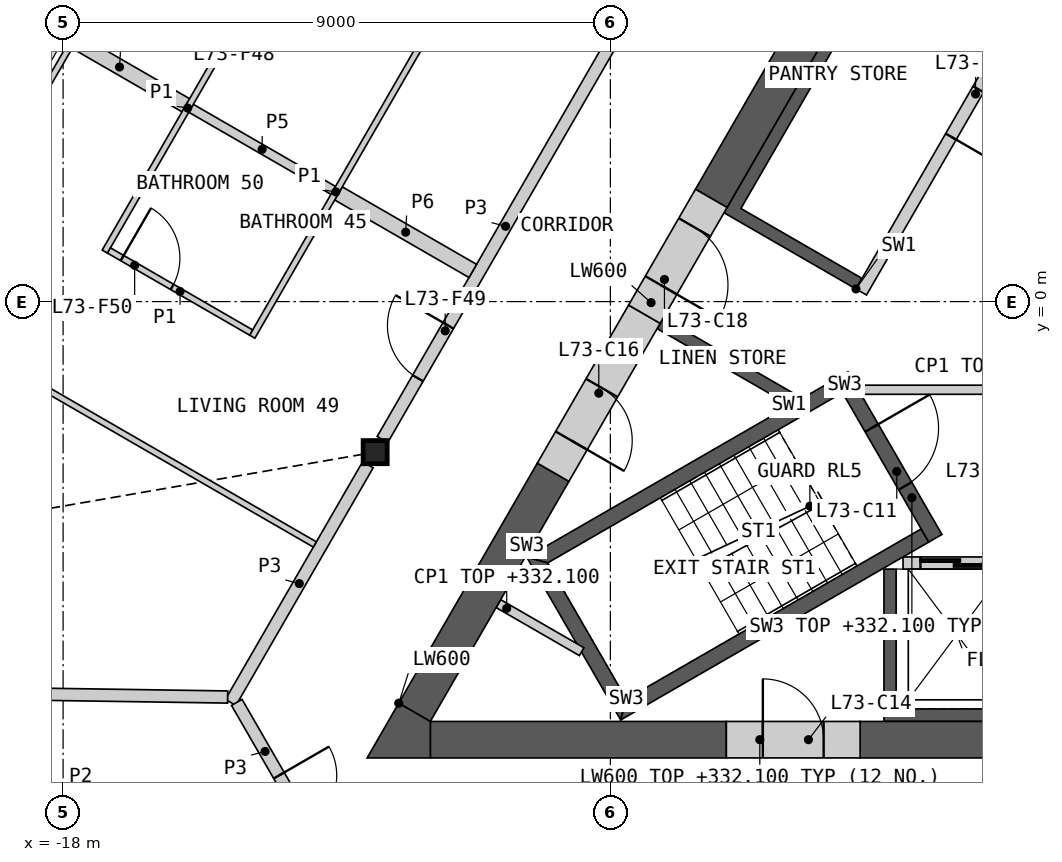
"""IFC4 building model, lengths in metres.
Left out: names, types, materials, properties, quantities, classifications, styles, units other than length and angle.
Written with IfcOpenShell. Run it as: python <this file> out.ifc"""

import sys

from ifc_helpers import new_model, si_unit, direction, frame, frame_2d, origin, origin_2d, place, context, subcontext, project, spatial, polyline, rectangle, i_section, outline, extrude, element, fill, save


model = new_model("IFC4")
c1 = context("Model", 3, precision=1e-05, world=origin(), true_north=direction((0.0, 1.0)))
c2 = subcontext(c1, "Body", "Model", "MODEL_VIEW")
j1 = project(units=[si_unit("LENGTHUNIT", "METRE"), si_unit("PLANEANGLEUNIT", "RADIAN")], contexts=[c1])
p1 = place(None, origin())
s1 = spatial("IfcSite", under=j1, at=p1, CompositionType="ELEMENT")
p2 = place(p1, origin())
s2 = spatial("IfcBuilding", under=s1, at=p2, CompositionType="ELEMENT")
p3 = place(p2, frame((0.0, 0.0, 329.0)))
s3 = spatial("IfcBuildingStorey", under=s2, at=p3, CompositionType="ELEMENT", Elevation=329.0)
p4 = place(p3, frame((-12.868, -2.476, 0.0), z_axis=(0.0, 0.0, 1.0), x_axis=(1.0, 0.0, 0.0)))
e1 = element("IfcColumn", 1, at=p4, inside=s3, PredefinedType="COLUMN", context=c2, shape_type="SweptSolid", body=[
    extrude(i_section(OverallWidth=0.396, OverallDepth=0.381, WebThickness=0.019, FlangeThickness=0.03, at=origin_2d()), origin(), (0.0, 0.0, 1.0), 3.4),
])
p5 = place(p3, origin())
e2 = element("IfcWall", 2, at=p5, inside=s3, PredefinedType="SHEAR", context=c2, shape_type="SweptSolid", body=[
    extrude(outline(polyline([(4.5, -4.4), (4.5, -6.906), (-4.5, -6.906), (-4.5, -4.4), (-4.3, -4.4), (-4.3, -6.7), (-2.3, -6.7), (-2.3, -4.4), (-2.1, -4.4), (-2.1, -6.7), (-0.1, -6.7), (-0.1, -4.4), (0.1, -4.4), (0.1, -6.7), (2.1, -6.7), (2.1, -4.4), (2.3, -4.4), (2.3, -6.7), (4.3, -6.7), (4.3, -4.4), (4.5, -4.4)])), origin(), (0.0, 0.0, 1.0), 3.1),
])
p6 = place(p3, frame((-4.187, -4.3, 0.0), z_axis=(0.0, 0.0, 1.0), x_axis=(1.0, 0.0, 0.0)))
e3 = element("IfcWall", 3, at=p6, inside=s3, PredefinedType="SOLIDWALL", context=c2, shape_type="SweptSolid", body=[
    extrude(rectangle(XDim=8.373, YDim=0.2, at=frame_2d((4.187, 0.0))), origin(), (0.0, 0.0, 1.0), 3.1),
])
p7 = place(p6, frame((0.287, 0.0, 0.0)))
e4 = element("IfcOpeningElement", 4, at=p7, cuts=e3, PredefinedType="OPENING", context=c2, shape_type="SweptSolid", body=[
    extrude(rectangle(XDim=1.2, YDim=2.1, at=frame_2d((0.6, 1.05))), frame((0.0, 0.11, 0.0), z_axis=(0.0, -1.0, 0.0), x_axis=(1.0, 0.0, 0.0)), (0.0, 0.0, 1.0), 0.22),
])
p8 = place(p6, frame((2.387, 0.0, 0.0)))
e5 = element("IfcOpeningElement", 5, at=p8, cuts=e3, PredefinedType="OPENING", context=c2, shape_type="SweptSolid", body=[
    extrude(rectangle(XDim=1.4, YDim=2.1, at=frame_2d((0.7, 1.05))), frame((0.0, 0.11, 0.0), z_axis=(0.0, -1.0, 0.0), x_axis=(1.0, 0.0, 0.0)), (0.0, 0.0, 1.0), 0.22),
])
p9 = place(p6, frame((4.737, 0.0, 0.0)))
e6 = element("IfcOpeningElement", 6, at=p9, cuts=e3, PredefinedType="OPENING", context=c2, shape_type="SweptSolid", body=[
    extrude(rectangle(XDim=1.1, YDim=2.1, at=frame_2d((0.55, 1.05))), frame((0.0, 0.11, 0.0), z_axis=(0.0, -1.0, 0.0), x_axis=(1.0, 0.0, 0.0)), (0.0, 0.0, 1.0), 0.22),
])
p10 = place(p6, frame((6.887, 0.0, 0.0)))
e7 = element("IfcOpeningElement", 7, at=p10, cuts=e3, PredefinedType="OPENING", context=c2, shape_type="SweptSolid", body=[
    extrude(rectangle(XDim=1.2, YDim=2.1, at=frame_2d((0.6, 1.05))), frame((0.0, 0.11, 0.0), z_axis=(0.0, -1.0, 0.0), x_axis=(1.0, 0.0, 0.0)), (0.0, 0.0, 1.0), 0.22),
])
p11 = place(p3, origin())
e8 = element("IfcWall", 8, at=p11, inside=s3, PredefinedType="SHEAR", context=c2, shape_type="SweptSolid", body=[
    extrude(outline(polyline([(-6.061, -1.697), (-8.231, -0.444), (-8.131, -0.271), (-5.96, -1.524), (-6.061, -1.697)])), origin(), (0.0, 0.0, 1.0), 3.1),
])
p12 = place(p3, origin())
e9 = element("IfcWall", 9, at=p12, inside=s3, PredefinedType="SHEAR", context=c2, shape_type="SweptSolid", body=[
    extrude(outline(polyline([(-4.96, 0.208), (-7.131, 1.461), (-3.731, 7.35), (-1.561, 6.097), (-1.66, 5.924), (-3.652, 7.074), (-6.852, 1.531), (-4.861, 0.381), (-4.96, 0.208)])), origin(), (0.0, 0.0, 1.0), 3.1),
])
p13 = place(p3, frame((-1.631, 5.776, 0.0), z_axis=(0.0, 0.0, 1.0), x_axis=(-0.499992876559, -0.866029516466, 0.0)))
e10 = element("IfcWall", 10, at=p13, inside=s3, PredefinedType="SOLIDWALL", context=c2, shape_type="SweptSolid", body=[
    extrude(rectangle(XDim=6.486, YDim=0.2, at=frame_2d((3.243, 0.0))), origin(), (0.0, 0.0, 1.0), 3.1),
])
p14 = place(p13, frame((2.637, 0.0, 0.0)))
e11 = element("IfcOpeningElement", 11, at=p14, cuts=e10, PredefinedType="OPENING", context=c2, shape_type="SweptSolid", body=[
    extrude(rectangle(XDim=0.9, YDim=2.1, at=frame_2d((0.45, 1.05))), frame((0.0, 0.11, 0.0), z_axis=(0.0, -1.0, 0.0), x_axis=(1.0, 0.0, 0.0)), (0.0, 0.0, 1.0), 0.22),
])
p15 = place(p3, frame((-4.941, -1.45, 0.0), z_axis=(0.0, 0.0, 1.0), x_axis=(1.0, 0.0, 0.0)))
e12 = element("IfcWall", 12, at=p15, inside=s3, PredefinedType="PARTITIONING", context=c2, shape_type="SweptSolid", body=[
    extrude(rectangle(XDim=9.882, YDim=0.15, at=frame_2d((4.941, 0.0))), origin(), (0.0, 0.0, 1.0), 3.1),
])
p16 = place(p15, frame((4.391, 0.0, 0.0)))
e13 = element("IfcOpeningElement", 13, at=p16, cuts=e12, PredefinedType="OPENING", context=c2, shape_type="SweptSolid", body=[
    extrude(rectangle(XDim=1.1, YDim=2.1, at=frame_2d((0.55, 1.05))), frame((0.0, 0.085, 0.0), z_axis=(0.0, -1.0, 0.0), x_axis=(1.0, 0.0, 0.0)), (0.0, 0.0, 1.0), 0.17),
])
p17 = place(p3, origin())
e14 = element("IfcWall", 14, at=p17, inside=s3, PredefinedType="SHEAR", context=c2, shape_type="SweptSolid", body=[
    extrude(outline(polyline([(-5.307, -1.281), (-10.374, -4.206), (-10.032, -4.298), (-5.182, -1.498), (-5.307, -1.281)])), origin(), (0.0, 0.0, 1.0), 3.1),
])
p18 = place(p3, origin())
e15 = element("IfcWall", 15, at=p18, inside=s3, PredefinedType="SHEAR", context=c2, shape_type="SweptSolid", body=[
    extrude(outline(polyline([(-10.374, -4.206), (-8.83, -6.881), (-8.738, -6.539), (-10.032, -4.298), (-10.374, -4.206)])), origin(), (0.0, 0.0, 1.0), 3.1),
])
p19 = place(p3, origin())
e16 = element("IfcWall", 16, at=p19, inside=s3, PredefinedType="SHEAR", context=c2, shape_type="SweptSolid", body=[
    extrude(outline(polyline([(-8.738, -6.539), (-8.83, -6.881), (-3.763, -3.956), (-3.888, -3.739), (-8.738, -6.539)])), origin(), (0.0, 0.0, 1.0), 3.1),
])
p20 = place(p3, frame((-5.199, -1.219, 0.0), z_axis=(0.0, 0.0, 1.0), x_axis=(0.499982516597, -0.866035497597, 0.0)))
e17 = element("IfcWall", 17, at=p20, inside=s3, PredefinedType="SHEAR", context=c2, shape_type="SweptSolid", body=[
    extrude(rectangle(XDim=3.088, YDim=0.25, at=frame_2d((1.544, 0.0))), origin(), (0.0, 0.0, 1.0), 3.1),
])
p21 = place(p20, frame((0.994, 0.0, 0.0)))
e18 = element("IfcOpeningElement", 18, at=p21, cuts=e17, PredefinedType="OPENING", context=c2, shape_type="SweptSolid", body=[
    extrude(rectangle(XDim=1.1, YDim=2.1, at=frame_2d((0.55, 1.05))), frame((0.0, 0.135, 0.0), z_axis=(0.0, -1.0, 0.0), x_axis=(1.0, 0.0, 0.0)), (0.0, 0.0, 1.0), 0.27),
])
p22 = place(p3, frame((-10.842, -4.967, 0.0), z_axis=(0.0, 0.0, 1.0), x_axis=(0.866098216386, -0.499873863663, 0.0)))
e19 = element("IfcWall", 19, at=p22, inside=s3, PredefinedType="PARTITIONING", context=c2, shape_type="SweptSolid", body=[
    extrude(rectangle(XDim=1.582, YDim=0.15, at=frame_2d((0.791, 0.0))), origin(), (0.0, 0.0, 1.0), 3.1),
])
p23 = place(p3, frame((-4.892, -7.206, 0.0), z_axis=(0.0, 0.0, 1.0), x_axis=(1.0, 0.0, 0.0)))
e20 = element("IfcWall", 20, at=p23, inside=s3, PredefinedType="SHEAR", context=c2, shape_type="SweptSolid", body=[
    extrude(rectangle(XDim=16.853, YDim=0.6, at=frame_2d((8.426, 0.0))), origin(), (0.0, 0.0, 1.0), 3.1),
])
p24 = place(p3, frame((-11.961, -7.206, 0.0), z_axis=(0.0, 0.0, 1.0), x_axis=(1.0, 0.0, 0.0)))
e21 = element("IfcWall", 21, at=p24, inside=s3, PredefinedType="SHEAR", context=c2, shape_type="SweptSolid", body=[
    extrude(rectangle(XDim=4.868, YDim=0.6, at=frame_2d((2.434, 0.0))), origin(), (0.0, 0.0, 1.0), 3.1),
])
p25 = place(p3, frame((-3.794, 7.84, 0.0), z_axis=(0.0, 0.0, 1.0), x_axis=(-0.499974747889, -0.866039982607, 0.0)))
e22 = element("IfcWall", 22, at=p25, inside=s3, PredefinedType="SHEAR", context=c2, shape_type="SweptSolid", body=[
    extrude(rectangle(XDim=7.092, YDim=0.6, at=frame_2d((3.546, 0.0))), origin(), (0.0, 0.0, 1.0), 3.1),
])
p26 = place(p3, frame((-9.941, -2.807, 0.0), z_axis=(0.0, 0.0, 1.0), x_axis=(-0.500020646047, -0.866013483456, 0.0)))
e23 = element("IfcWall", 23, at=p26, inside=s3, PredefinedType="SHEAR", context=c2, shape_type="SweptSolid", body=[
    extrude(rectangle(XDim=4.559, YDim=0.6, at=frame_2d((2.28, 0.0))), origin(), (0.0, 0.0, 1.0), 3.1),
])
p27 = place(p3, origin())
e24 = element("IfcWall", 24, at=p27, inside=s3, PredefinedType="SHEAR", context=c2, shape_type="SweptSolid", body=[
    extrude(outline(polyline([(-12.48, -6.606), (-11.961, -6.906), (-11.961, -7.506), (-13.0, -7.506), (-12.48, -6.606)])), origin(), (0.0, 0.0, 1.0), 3.1),
])
p28 = place(p3, frame((-7.092, -7.206, 0.0), z_axis=(0.0, 0.0, 1.0), x_axis=(1.0, 0.0, 0.0)))
e25 = element("IfcWall", 25, at=p28, inside=s3, PredefinedType="SHEAR", context=c2, shape_type="SweptSolid", body=[
    extrude(rectangle(XDim=2.2, YDim=0.6, at=frame_2d((1.1, 0.0))), origin(), (0.0, 0.0, 1.0), 3.1),
])
p29 = place(p28, frame((0.6, 0.0, 0.0)))
e26 = element("IfcOpeningElement", 26, at=p29, cuts=e25, PredefinedType="OPENING", context=c2, shape_type="SweptSolid", body=[
    extrude(rectangle(XDim=1.0, YDim=2.1, at=frame_2d((0.5, 1.05))), frame((0.0, 0.31, 0.0), z_axis=(0.0, -1.0, 0.0), x_axis=(1.0, 0.0, 0.0)), (0.0, 0.0, 1.0), 0.62),
])
p30 = place(p3, frame((-8.44, -0.208, 0.0), z_axis=(0.0, 0.0, 1.0), x_axis=(-0.499997052475, -0.866027105532, 0.0)))
e27 = element("IfcWall", 27, at=p30, inside=s3, PredefinedType="SHEAR", context=c2, shape_type="SweptSolid", body=[
    extrude(rectangle(XDim=3.001, YDim=0.6, at=frame_2d((1.501, 0.0))), origin(), (0.0, 0.0, 1.0), 3.1),
])
p31 = place(p30, frame((1.4, 0.0, 0.0)))
e28 = element("IfcOpeningElement", 28, at=p31, cuts=e27, PredefinedType="OPENING", context=c2, shape_type="SweptSolid", body=[
    extrude(rectangle(XDim=1.0, YDim=2.1, at=frame_2d((0.5, 1.05))), frame((0.0, 0.31, 0.0), z_axis=(0.0, -1.0, 0.0), x_axis=(1.0, 0.0, 0.0)), (0.0, 0.0, 1.0), 0.62),
])
p32 = place(p3, frame((-7.34, 1.698, 0.0), z_axis=(0.0, 0.0, 1.0), x_axis=(-0.50002983664, -0.866008176907, 0.0)))
e29 = element("IfcWall", 29, at=p32, inside=s3, PredefinedType="SHEAR", context=c2, shape_type="SweptSolid", body=[
    extrude(rectangle(XDim=2.2, YDim=0.6, at=frame_2d((1.1, 0.0))), origin(), (0.0, 0.0, 1.0), 3.1),
])
p33 = place(p32, frame((0.55, 0.0, 0.0)))
e30 = element("IfcOpeningElement", 30, at=p33, cuts=e29, PredefinedType="OPENING", context=c2, shape_type="SweptSolid", body=[
    extrude(rectangle(XDim=1.1, YDim=2.1, at=frame_2d((0.55, 1.05))), frame((0.0, 0.31, 0.0), z_axis=(0.0, -1.0, 0.0), x_axis=(1.0, 0.0, 0.0)), (0.0, 0.0, 1.0), 0.62),
])
p34 = place(p3, frame((-12.748, -2.269, 0.0), z_axis=(0.0, 0.0, 1.0), x_axis=(0.499984266882, 0.866034487114, 0.0)))
e31 = element("IfcWall", 31, at=p34, inside=s3, PredefinedType="PARTITIONING", context=c2, shape_type="SweptSolid", body=[
    extrude(rectangle(XDim=8.099, YDim=0.2, at=frame_2d((4.049, 0.0))), origin(), (0.0, 0.0, 1.0), 3.1),
])
p35 = place(p34, frame((1.164, 0.0, 0.0)))
e32 = element("IfcOpeningElement", 32, at=p35, cuts=e31, PredefinedType="OPENING", context=c2, shape_type="SweptSolid", body=[
    extrude(rectangle(XDim=1.0, YDim=2.1, at=frame_2d((0.5, 1.05))), frame((0.0, 0.11, 0.0), z_axis=(0.0, -1.0, 0.0), x_axis=(1.0, 0.0, 0.0)), (0.0, 0.0, 1.0), 0.22),
])
p36 = place(p3, frame((-15.244, -6.592, 0.0), z_axis=(0.0, 0.0, 1.0), x_axis=(0.49999094734, 0.866030630277, 0.0)))
e33 = element("IfcWall", 33, at=p36, inside=s3, PredefinedType="PARTITIONING", context=c2, shape_type="SweptSolid", body=[
    extrude(rectangle(XDim=4.513, YDim=0.2, at=frame_2d((2.256, 0.0))), origin(), (0.0, 0.0, 1.0), 3.1),
])
p37 = place(p3, frame((-15.144, -6.592, 0.0), z_axis=(0.0, 0.0, 1.0), x_axis=(0.499958791762, -0.866049194065, 0.0)))
e34 = element("IfcWall", 34, at=p37, inside=s3, PredefinedType="PARTITIONING", context=c2, shape_type="SweptSolid", body=[
    extrude(rectangle(XDim=3.726, YDim=0.2, at=frame_2d((1.863, 0.0))), origin(), (0.0, 0.0, 1.0), 3.1),
])
p38 = place(p37, frame((1.388, 0.0, 0.0)))
e35 = element("IfcOpeningElement", 35, at=p38, cuts=e34, PredefinedType="OPENING", context=c2, shape_type="SweptSolid", body=[
    extrude(rectangle(XDim=0.95, YDim=2.1, at=frame_2d((0.475, 1.05))), frame((0.0, 0.11, 0.0), z_axis=(0.0, -1.0, 0.0), x_axis=(1.0, 0.0, 0.0)), (0.0, 0.0, 1.0), 0.22),
])
p39 = place(p3, frame((-13.471, 1.779, 0.0), z_axis=(0.0, 0.0, 1.0), x_axis=(0.865989465428, -0.500062241894, 0.0)))
e36 = element("IfcWall", 36, at=p39, inside=s3, PredefinedType="PARTITIONING", context=c2, shape_type="SweptSolid", body=[
    extrude(rectangle(XDim=2.55, YDim=0.25, at=frame_2d((1.275, 0.0))), origin(), (0.0, 0.0, 1.0), 2.33),
])
p40 = place(p3, frame((-18.161, 4.487, 0.0), z_axis=(0.0, 0.0, 1.0), x_axis=(0.866012646713, -0.500022095245, 0.0)))
e37 = element("IfcWall", 37, at=p40, inside=s3, PredefinedType="PARTITIONING", context=c2, shape_type="SweptSolid", body=[
    extrude(rectangle(XDim=2.516, YDim=0.25, at=frame_2d((1.258, 0.0))), origin(), (0.0, 0.0, 1.0), 2.33),
])
p41 = place(p3, frame((-30.014, -6.282, 0.0), z_axis=(0.0, 0.0, 1.0), x_axis=(0.99988686643, -0.015041753265, 0.0)))
e38 = element("IfcWall", 38, at=p41, inside=s3, PredefinedType="PARTITIONING", context=c2, shape_type="SweptSolid", body=[
    extrude(rectangle(XDim=14.721, YDim=0.2, at=frame_2d((7.361, 0.0))), origin(), (0.0, 0.0, 1.0), 2.33),
])
p42 = place(p3, frame((-19.12, -6.506, 0.0), z_axis=(0.0, 0.0, 1.0), x_axis=(0.499978535015, -0.866037796245, 0.0)))
e39 = element("IfcWall", 39, at=p42, inside=s3, PredefinedType="PARTITIONING", context=c2, shape_type="SweptSolid", body=[
    extrude(rectangle(XDim=3.686, YDim=0.2, at=frame_2d((1.843, 0.0))), origin(), (0.0, 0.0, 1.0), 2.33),
])
p43 = place(p3, frame((-15.896, 3.179, 0.0), z_axis=(0.0, 0.0, 1.0), x_axis=(0.866059108428, -0.4999416173, 0.0)))
e40 = element("IfcWall", 40, at=p43, inside=s3, PredefinedType="PLUMBINGWALL", context=c2, shape_type="SweptSolid", body=[
    extrude(rectangle(XDim=2.7, YDim=0.15, at=frame_2d((1.35, 0.0))), origin(), (0.0, 0.0, 1.0), 2.33),
])
p44 = place(p3, frame((-24.815, 2.33, 0.0), z_axis=(0.0, 0.0, 1.0), x_axis=(0.866027776657, -0.499995890042, 0.0)))
e41 = element("IfcWall", 41, at=p44, inside=s3, PredefinedType="PARTITIONING", context=c2, shape_type="SweptSolid", body=[
    extrude(rectangle(XDim=12.649, YDim=0.1, at=frame_2d((6.325, 0.0))), origin(), (0.0, 0.0, 1.0), 2.33),
])
p45 = place(p44, frame((3.176, 0.0, 0.0)))
e42 = element("IfcOpeningElement", 42, at=p45, cuts=e41, PredefinedType="OPENING", context=c2, shape_type="SweptSolid", body=[
    extrude(rectangle(XDim=0.95, YDim=2.1, at=frame_2d((0.475, 1.05))), frame((0.0, 0.06, 0.0), z_axis=(0.0, -1.0, 0.0), x_axis=(1.0, 0.0, 0.0)), (0.0, 0.0, 1.0), 0.12),
])
p46 = place(p3, frame((-17.314, 0.823, 0.0), z_axis=(0.0, 0.0, 1.0), x_axis=(0.499988730927, 0.866031909889, 0.0)))
e43 = element("IfcWall", 43, at=p46, inside=s3, PredefinedType="PARTITIONING", context=c2, shape_type="SweptSolid", body=[
    extrude(rectangle(XDim=5.45, YDim=0.1, at=frame_2d((2.725, 0.0))), origin(), (0.0, 0.0, 1.0), 2.33),
])
p47 = place(p46, frame((4.15, 0.0, 0.0)))
e44 = element("IfcOpeningElement", 44, at=p47, cuts=e43, PredefinedType="OPENING", context=c2, shape_type="SweptSolid", body=[
    extrude(rectangle(XDim=0.95, YDim=2.1, at=frame_2d((0.475, 1.05))), frame((0.0, 0.06, 0.0), z_axis=(0.0, -1.0, 0.0), x_axis=(1.0, 0.0, 0.0)), (0.0, 0.0, 1.0), 0.12),
])
p48 = place(p3, frame((-14.889, -0.577, 0.0), z_axis=(0.0, 0.0, 1.0), x_axis=(0.500015767406, 0.866016300277, 0.0)))
e45 = element("IfcWall", 45, at=p48, inside=s3, PredefinedType="PARTITIONING", context=c2, shape_type="SweptSolid", body=[
    extrude(rectangle(XDim=5.5, YDim=0.1, at=frame_2d((2.75, 0.0))), origin(), (0.0, 0.0, 1.0), 2.33),
])
p49 = place(p3, frame((-20.405, -0.158, 0.0), z_axis=(0.0, 0.0, 1.0), x_axis=(0.499989096993, 0.866031698547, 0.0)))
e46 = element("IfcWall", 46, at=p49, inside=s3, PredefinedType="PARTITIONING", context=c2, shape_type="SweptSolid", body=[
    extrude(rectangle(XDim=5.02, YDim=0.1, at=frame_2d((2.51, 0.0))), origin(), (0.0, 0.0, 1.0), 2.33),
])
p50 = place(p49, frame((0.862, 0.0, 0.0)))
e47 = element("IfcOpeningElement", 47, at=p50, cuts=e46, PredefinedType="OPENING", context=c2, shape_type="SweptSolid", body=[
    extrude(rectangle(XDim=0.95, YDim=2.1, at=frame_2d((0.475, 1.05))), frame((0.0, 0.06, 0.0), z_axis=(0.0, -1.0, 0.0), x_axis=(1.0, 0.0, 0.0)), (0.0, 0.0, 1.0), 0.12),
])
p51 = place(p3, frame((-17.246, 0.841, 0.0), z_axis=(0.0, 0.0, 1.0), x_axis=(0.86599734893, -0.500048589285, 0.0)))
e48 = element("IfcWall", 48, at=p51, inside=s3, PredefinedType="PARTITIONING", context=c2, shape_type="SweptSolid", body=[
    extrude(rectangle(XDim=2.7, YDim=0.1, at=frame_2d((1.35, 0.0))), origin(), (0.0, 0.0, 1.0), 2.33),
])
p52 = place(p51, frame((0.25, 0.0, 0.0)))
e49 = element("IfcOpeningElement", 49, at=p52, cuts=e48, PredefinedType="OPENING", context=c2, shape_type="SweptSolid", body=[
    extrude(rectangle(XDim=0.95, YDim=2.1, at=frame_2d((0.475, 1.05))), frame((0.0, 0.06, 0.0), z_axis=(0.0, -1.0, 0.0), x_axis=(1.0, 0.0, 0.0)), (0.0, 0.0, 1.0), 0.12),
])
p53 = place(p7, origin())
e50 = element("IfcDoor", 50, at=p53, inside=s3, OperationType="SLIDING_TO_LEFT", PredefinedType="DOOR", context=c2, shape_type="SweptSolid", body=[
    extrude(rectangle(XDim=1.2, YDim=2.1, at=frame_2d((0.6, 1.05))), frame((0.0, 0.025, 0.0), z_axis=(0.0, -1.0, 0.0), x_axis=(1.0, 0.0, 0.0)), (0.0, 0.0, 1.0), 0.05),
])
fill(e4, e50)
p54 = place(p14, origin())
e51 = element("IfcDoor", 51, at=p54, inside=s3, OperationType="SINGLE_SWING_RIGHT", PredefinedType="DOOR", context=c2, shape_type="SweptSolid", body=[
    extrude(rectangle(XDim=0.9, YDim=2.1, at=frame_2d((0.45, 1.05))), frame((0.0, 0.025, 0.0), z_axis=(0.0, -1.0, 0.0), x_axis=(1.0, 0.0, 0.0)), (0.0, 0.0, 1.0), 0.05),
])
fill(e11, e51)
p55 = place(p21, origin())
e52 = element("IfcDoor", 52, at=p55, inside=s3, OperationType="SINGLE_SWING_LEFT", PredefinedType="DOOR", context=c2, shape_type="SweptSolid", body=[
    extrude(rectangle(XDim=1.1, YDim=2.1, at=frame_2d((0.55, 1.05))), frame((0.0, 0.025, 0.0), z_axis=(0.0, -1.0, 0.0), x_axis=(1.0, 0.0, 0.0)), (0.0, 0.0, 1.0), 0.05),
])
fill(e18, e52)
p56 = place(p29, origin())
e53 = element("IfcDoor", 53, at=p56, inside=s3, OperationType="SINGLE_SWING_LEFT", PredefinedType="DOOR", context=c2, shape_type="SweptSolid", body=[
    extrude(rectangle(XDim=1.0, YDim=2.1, at=frame_2d((0.5, 1.05))), frame((0.0, 0.055, 0.0), z_axis=(0.0, -1.0, 0.0), x_axis=(1.0, 0.0, 0.0)), (0.0, 0.0, 1.0), 0.05),
])
fill(e26, e53)
p57 = place(p31, origin())
e54 = element("IfcDoor", 54, at=p57, inside=s3, OperationType="SINGLE_SWING_RIGHT", PredefinedType="DOOR", context=c2, shape_type="SweptSolid", body=[
    extrude(rectangle(XDim=1.0, YDim=2.1, at=frame_2d((0.5, 1.05))), frame((0.0, 0.055, 0.0), z_axis=(0.0, -1.0, 0.0), x_axis=(1.0, 0.0, 0.0)), (0.0, 0.0, 1.0), 0.05),
])
fill(e28, e54)
p58 = place(p33, origin())
e55 = element("IfcDoor", 55, at=p58, inside=s3, OperationType="SINGLE_SWING_RIGHT", PredefinedType="DOOR", context=c2, shape_type="SweptSolid", body=[
    extrude(rectangle(XDim=1.1, YDim=2.1, at=frame_2d((0.55, 1.05))), frame((0.0, 0.055, 0.0), z_axis=(0.0, -1.0, 0.0), x_axis=(1.0, 0.0, 0.0)), (0.0, 0.0, 1.0), 0.05),
])
fill(e30, e55)
p59 = place(p35, origin())
e56 = element("IfcDoor", 56, at=p59, inside=s3, OperationType="SINGLE_SWING_RIGHT", PredefinedType="DOOR", context=c2, shape_type="SweptSolid", body=[
    extrude(rectangle(XDim=1.0, YDim=2.1, at=frame_2d((0.5, 1.05))), frame((0.0, 0.025, 0.0), z_axis=(0.0, -1.0, 0.0), x_axis=(1.0, 0.0, 0.0)), (0.0, 0.0, 1.0), 0.05),
])
fill(e32, e56)
p60 = place(p52, origin())
e57 = element("IfcDoor", 57, at=p60, inside=s3, OperationType="SINGLE_SWING_LEFT", PredefinedType="DOOR", context=c2, shape_type="SweptSolid", body=[
    extrude(rectangle(XDim=0.95, YDim=2.1, at=frame_2d((0.475, 1.05))), frame((0.0, 0.025, 0.0), z_axis=(0.0, -1.0, 0.0), x_axis=(1.0, 0.0, 0.0)), (0.0, 0.0, 1.0), 0.05),
])
fill(e49, e57)
p61 = place(p38, origin())
e58 = element("IfcDoor", 58, at=p61, inside=s3, OperationType="SINGLE_SWING_LEFT", PredefinedType="DOOR", context=c2, shape_type="SweptSolid", body=[
    extrude(rectangle(XDim=0.95, YDim=2.1, at=frame_2d((0.475, 1.05))), frame((0.0, 0.025, 0.0), z_axis=(0.0, -1.0, 0.0), x_axis=(1.0, 0.0, 0.0)), (0.0, 0.0, 1.0), 0.05),
])
fill(e35, e58)
save(model, sys.argv[1])
